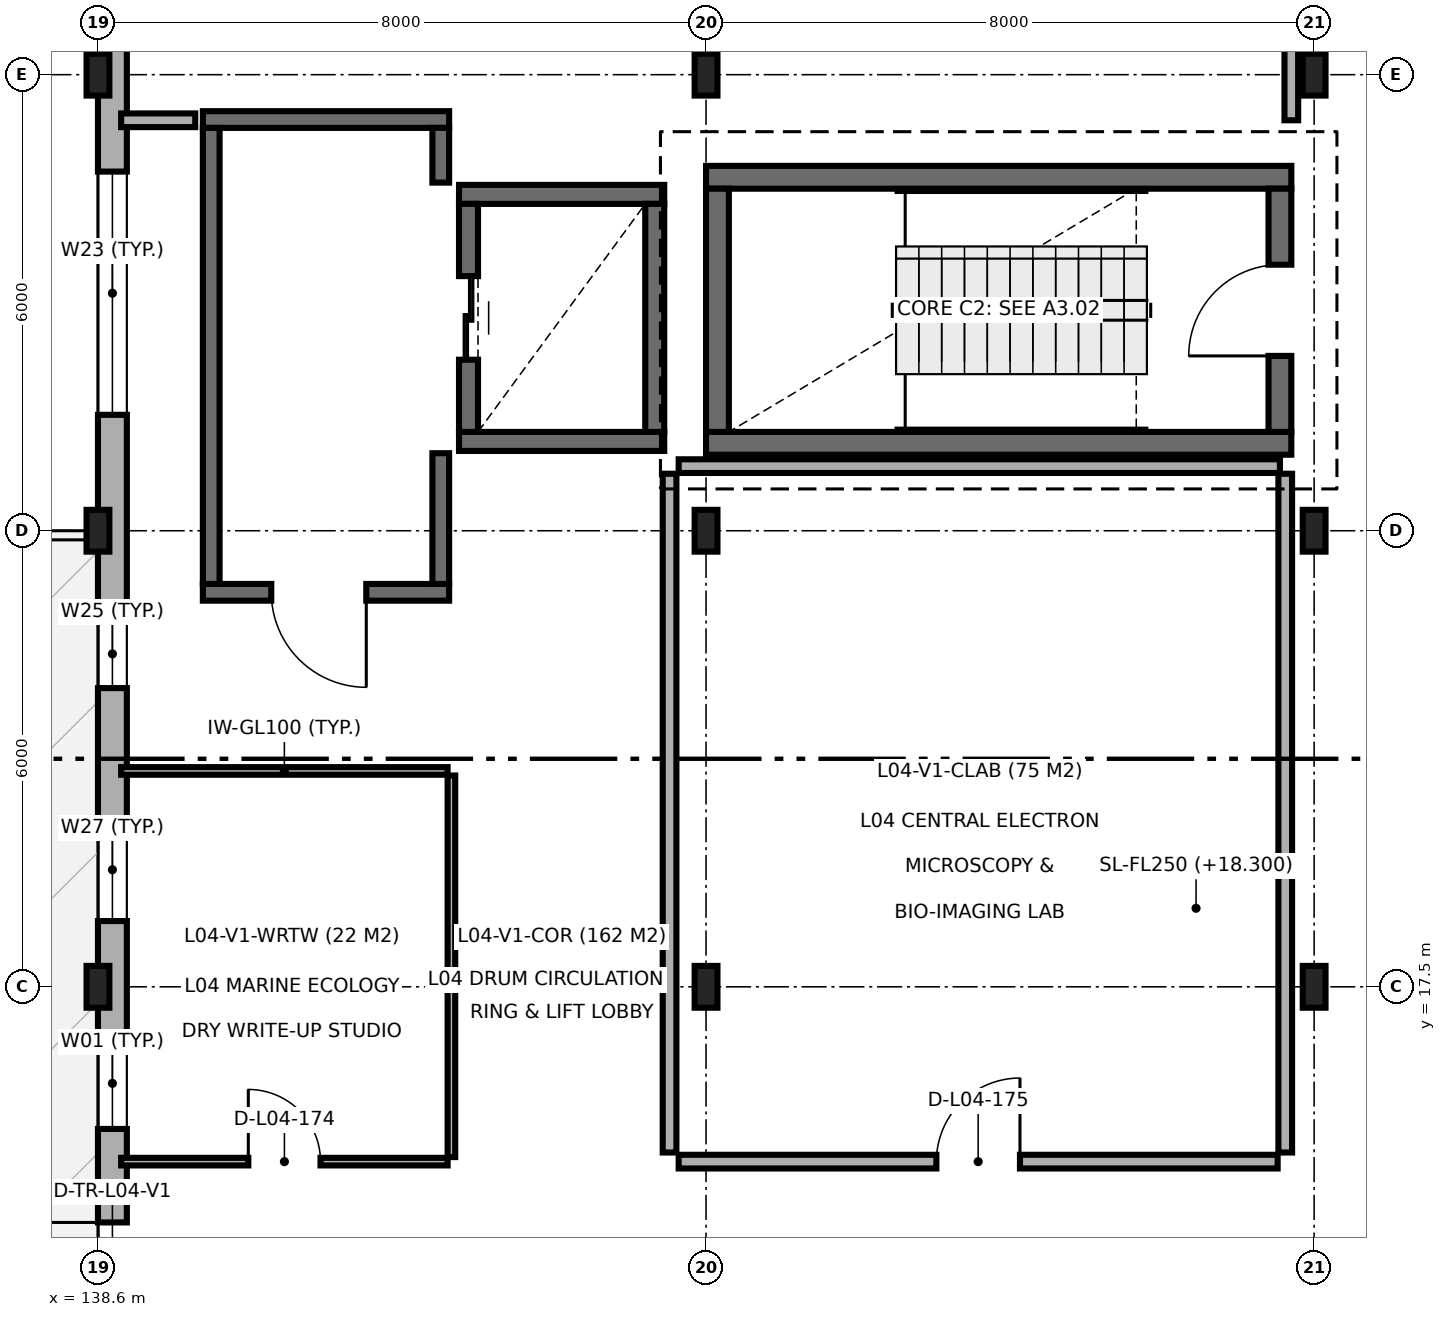
"""IFC4 building model, lengths in metres.
Left out: names, types, materials, properties, quantities, classifications, styles, units other than length and angle.
Written with IfcOpenShell. Run it as: python <this file> out.ifc"""

import sys

from ifc_helpers import new_model, si_unit, direction, frame, frame_2d, origin, origin_2d, place, context, subcontext, project, spatial, rectangle, i_section, extrude, element, fill, save


model = new_model("IFC4")
c1 = context("Model", 3, precision=1e-05, world=origin(), true_north=direction((0.0, 1.0)))
c2 = subcontext(c1, "Body", "Model", "MODEL_VIEW")
j1 = project(units=[si_unit("LENGTHUNIT", "METRE"), si_unit("PLANEANGLEUNIT", "RADIAN")], contexts=[c1])
p1 = place(None, origin())
s1 = spatial("IfcSite", under=j1, at=p1, CompositionType="ELEMENT")
p2 = place(p1, origin())
s2 = spatial("IfcBuilding", under=s1, at=p2, CompositionType="ELEMENT")
p3 = place(p2, frame((0.0, 0.0, 18.3)))
s3 = spatial("IfcBuildingStorey", under=s2, at=p3, CompositionType="ELEMENT", Elevation=18.3)
for number, where, z_axis, x_axis in (
    (1, (138.6, 17.5, 0.0), (0.0, 0.0, 1.0), (1.0, 0.0, 0.0)),
    (2, (138.6, 23.5, 0.0), (0.0, 0.0, 1.0), (1.0, 0.0, 0.0)),
    (3, (138.6, 29.5, 0.0), (0.0, 0.0, 1.0), (1.0, 0.0, 0.0)),
    (4, (146.6, 17.5, 0.0), (0.0, 0.0, 1.0), (1.0, 0.0, 0.0)),
    (5, (146.6, 23.5, 0.0), (0.0, 0.0, 1.0), (1.0, 0.0, 0.0)),
    (6, (146.6, 29.5, 0.0), (0.0, 0.0, 1.0), (1.0, 0.0, 0.0)),
    (7, (154.6, 17.5, 0.0), (0.0, 0.0, 1.0), (1.0, 0.0, 0.0)),
    (8, (154.6, 23.5, 0.0), (0.0, 0.0, 1.0), (1.0, 0.0, 0.0)),
    (9, (154.6, 29.5, 0.0), (0.0, 0.0, 1.0), (1.0, 0.0, 0.0)),
):
    element("IfcColumn", number, at=place(p3, frame(where, z_axis=z_axis, x_axis=x_axis)), inside=s3, PredefinedType="COLUMN", context=c2, shape_type="SweptSolid", body=[
        extrude(i_section(OverallWidth=0.3, OverallDepth=0.55, WebThickness=0.015, FlangeThickness=0.029, FilletRadius=0.027, at=origin_2d()), origin(), (0.0, 0.0, 1.0), 4.5),
    ])
for number, where, z_axis, x_axis in (
    (10, (146.6, 24.65, 0.0), (0.0, 0.0, 1.0), (1.0, 0.0, 0.0)),
    (11, (154.3, 28.15, 0.0), (0.0, 0.0, 1.0), (-1.0, 0.0, 0.0)),
):
    element("IfcWall", number, at=place(p3, frame(where, z_axis=z_axis, x_axis=x_axis)), inside=s3, PredefinedType="SHEAR", context=c2, shape_type="SweptSolid", body=[
        extrude(rectangle(XDim=7.7, YDim=0.3, at=frame_2d((3.85, 0.0))), origin(), (0.0, 0.0, 1.0), 4.5),
    ])
p4 = place(p3, frame((146.75, 28.0, 0.0), z_axis=(0.0, 0.0, 1.0), x_axis=(0.0, -1.0, 0.0)))
e12 = element("IfcWall", 12, at=p4, inside=s3, PredefinedType="SHEAR", context=c2, shape_type="SweptSolid", body=[
    extrude(rectangle(XDim=3.2, YDim=0.3, at=frame_2d((1.6, 0.0))), origin(), (0.0, 0.0, 1.0), 4.5),
])
p5 = place(p3, frame((154.15, 24.8, 0.0), z_axis=(0.0, 0.0, 1.0), x_axis=(0.0, 1.0, 0.0)))
e13 = element("IfcWall", 13, at=p5, inside=s3, PredefinedType="SHEAR", context=c2, shape_type="SweptSolid", body=[
    extrude(rectangle(XDim=3.2, YDim=0.3, at=frame_2d((1.6, 0.0))), origin(), (0.0, 0.0, 1.0), 4.5),
])
p6 = place(p5, frame((1.0, 0.0, 0.0)))
e14 = element("IfcOpeningElement", 14, at=p6, cuts=e13, PredefinedType="OPENING", context=c2, shape_type="SweptSolid", body=[
    extrude(rectangle(XDim=1.2, YDim=2.15, at=frame_2d((0.6, 1.075))), frame((0.0, 0.16, 0.0), z_axis=(0.0, -1.0, 0.0), x_axis=(1.0, 0.0, 0.0)), (0.0, 0.0, 1.0), 0.32),
])
for number, where, z_axis, x_axis in (
    (15, (143.35, 24.675, 0.0), (0.0, 0.0, 1.0), (1.0, 0.0, 0.0)),
    (16, (146.05, 27.925, 0.0), (0.0, 0.0, 1.0), (-1.0, 0.0, 0.0)),
):
    element("IfcWall", number, at=place(p3, frame(where, z_axis=z_axis, x_axis=x_axis)), inside=s3, PredefinedType="SHEAR", context=c2, shape_type="SweptSolid", body=[
        extrude(rectangle(XDim=2.7, YDim=0.25, at=frame_2d((1.35, 0.0))), origin(), (0.0, 0.0, 1.0), 4.5),
    ])
p7 = place(p3, frame((143.475, 27.8, 0.0), z_axis=(0.0, 0.0, 1.0), x_axis=(0.0, -1.0, 0.0)))
e17 = element("IfcWall", 17, at=p7, inside=s3, PredefinedType="SHEAR", context=c2, shape_type="SweptSolid", body=[
    extrude(rectangle(XDim=3.0, YDim=0.25, at=frame_2d((1.5, 0.0))), origin(), (0.0, 0.0, 1.0), 4.5),
])
p8 = place(p7, frame((0.95, 0.0, 0.0)))
e18 = element("IfcOpeningElement", 18, at=p8, cuts=e17, PredefinedType="OPENING", context=c2, shape_type="SweptSolid", body=[
    extrude(rectangle(XDim=1.1, YDim=2.15, at=frame_2d((0.55, 1.075))), frame((0.0, 0.135, 0.0), z_axis=(0.0, -1.0, 0.0), x_axis=(1.0, 0.0, 0.0)), (0.0, 0.0, 1.0), 0.27),
])
p9 = place(p3, frame((145.925, 24.8, 0.0), z_axis=(0.0, 0.0, 1.0), x_axis=(0.0, 1.0, 0.0)))
e19 = element("IfcWall", 19, at=p9, inside=s3, PredefinedType="SHEAR", context=c2, shape_type="SweptSolid", body=[
    extrude(rectangle(XDim=3.0, YDim=0.25, at=frame_2d((1.5, 0.0))), origin(), (0.0, 0.0, 1.0), 4.5),
])
p10 = place(p3, frame((139.98, 22.69, 0.0), z_axis=(0.0, 0.0, 1.0), x_axis=(1.0, 0.0, 0.0)))
e20 = element("IfcWall", 20, at=p10, inside=s3, PredefinedType="SOLIDWALL", context=c2, shape_type="SweptSolid", body=[
    extrude(rectangle(XDim=3.24, YDim=0.22, at=frame_2d((1.62, 0.0))), origin(), (0.0, 0.0, 1.0), 4.28),
])
p11 = place(p10, frame((0.9, 0.0, 0.0)))
e21 = element("IfcOpeningElement", 21, at=p11, cuts=e20, PredefinedType="OPENING", context=c2, shape_type="SweptSolid", body=[
    extrude(rectangle(XDim=1.25, YDim=2.15, at=frame_2d((0.625, 1.075))), frame((0.0, 0.12, 0.0), z_axis=(0.0, -1.0, 0.0), x_axis=(1.0, 0.0, 0.0)), (0.0, 0.0, 1.0), 0.24),
])
p12 = place(p3, frame((143.22, 28.91, 0.0), z_axis=(0.0, 0.0, 1.0), x_axis=(-1.0, 0.0, 0.0)))
e22 = element("IfcWall", 22, at=p12, inside=s3, PredefinedType="SOLIDWALL", context=c2, shape_type="SweptSolid", body=[
    extrude(rectangle(XDim=3.24, YDim=0.22, at=frame_2d((1.62, 0.0))), origin(), (0.0, 0.0, 1.0), 4.28),
])
p13 = place(p3, frame((140.09, 28.8, 0.0), z_axis=(0.0, 0.0, 1.0), x_axis=(0.0, -1.0, 0.0)))
e23 = element("IfcWall", 23, at=p13, inside=s3, PredefinedType="SOLIDWALL", context=c2, shape_type="SweptSolid", body=[
    extrude(rectangle(XDim=6.0, YDim=0.22, at=frame_2d((3.0, 0.0))), origin(), (0.0, 0.0, 1.0), 4.28),
])
p14 = place(p3, frame((143.11, 22.8, 0.0), z_axis=(0.0, 0.0, 1.0), x_axis=(0.0, 1.0, 0.0)))
e24 = element("IfcWall", 24, at=p14, inside=s3, PredefinedType="SOLIDWALL", context=c2, shape_type="SweptSolid", body=[
    extrude(rectangle(XDim=1.72, YDim=0.22, at=frame_2d((0.86, 0.0))), origin(), (0.0, 0.0, 1.0), 4.28),
])
p15 = place(p3, frame((143.11, 28.08, 0.0), z_axis=(0.0, 0.0, 1.0), x_axis=(0.0, 1.0, 0.0)))
e25 = element("IfcWall", 25, at=p15, inside=s3, PredefinedType="SOLIDWALL", context=c2, shape_type="SweptSolid", body=[
    extrude(rectangle(XDim=0.72, YDim=0.22, at=frame_2d((0.36, 0.0))), origin(), (0.0, 0.0, 1.0), 4.28),
])
p16 = place(p3, frame((138.79, 41.138, 0.0), z_axis=(0.0, 0.0, 1.0), x_axis=(0.0, -1.0, 0.0)))
e26 = element("IfcWall", 26, at=p16, inside=s3, PredefinedType="SOLIDWALL", context=c2, shape_type="SweptSolid", body=[
    extrude(rectangle(XDim=36.238, YDim=0.38, at=frame_2d((18.119, 0.0))), origin(), (0.0, 0.0, 1.0), 4.28),
])
p17 = place(p16, frame((26.738, 0.0, 0.0)))
e27 = element("IfcOpeningElement", 27, at=p17, cuts=e26, PredefinedType="OPENING", context=c2, shape_type="SweptSolid", body=[
    extrude(rectangle(XDim=1.4, YDim=2.2, at=frame_2d((0.7, 1.1))), frame((0.0, 0.2, 0.0), z_axis=(0.0, -1.0, 0.0), x_axis=(1.0, 0.0, 0.0)), (0.0, 0.0, 1.0), 0.4),
])
p18 = place(p16, frame((8.268, 0.0, 0.9)))
e28 = element("IfcOpeningElement", 28, at=p18, cuts=e26, PredefinedType="OPENING", context=c2, shape_type="SweptSolid", body=[
    extrude(rectangle(XDim=2.0, YDim=2.4, at=frame_2d((1.0, 1.2))), frame((0.0, 0.2, 0.0), z_axis=(0.0, -1.0, 0.0), x_axis=(1.0, 0.0, 0.0)), (0.0, 0.0, 1.0), 0.4),
])
p19 = place(p16, frame((12.913, 0.0, 0.9)))
e29 = element("IfcOpeningElement", 29, at=p19, cuts=e26, PredefinedType="OPENING", context=c2, shape_type="SweptSolid", body=[
    extrude(rectangle(XDim=3.2, YDim=2.4, at=frame_2d((1.6, 1.2))), frame((0.0, 0.2, 0.0), z_axis=(0.0, -1.0, 0.0), x_axis=(1.0, 0.0, 0.0)), (0.0, 0.0, 1.0), 0.4),
])
p20 = place(p16, frame((18.808, 0.0, 0.9)))
e30 = element("IfcOpeningElement", 30, at=p20, cuts=e26, PredefinedType="OPENING", context=c2, shape_type="SweptSolid", body=[
    extrude(rectangle(XDim=0.9, YDim=1.4, at=frame_2d((0.45, 0.7))), frame((0.0, 0.2, 0.0), z_axis=(0.0, -1.0, 0.0), x_axis=(1.0, 0.0, 0.0)), (0.0, 0.0, 1.0), 0.4),
])
p21 = place(p16, frame((21.423, 0.0, 0.9)))
e31 = element("IfcOpeningElement", 31, at=p21, cuts=e26, PredefinedType="OPENING", context=c2, shape_type="SweptSolid", body=[
    extrude(rectangle(XDim=1.35, YDim=1.95, at=frame_2d((0.675, 0.975))), frame((0.0, 0.2, 0.0), z_axis=(0.0, -1.0, 0.0), x_axis=(1.0, 0.0, 0.0)), (0.0, 0.0, 1.0), 0.4),
])
p22 = place(p16, frame((24.308, 0.0, 0.9)))
e32 = element("IfcOpeningElement", 32, at=p22, cuts=e26, PredefinedType="OPENING", context=c2, shape_type="SweptSolid", body=[
    extrude(rectangle(XDim=1.2, YDim=1.8, at=frame_2d((0.6, 0.9))), frame((0.0, 0.2, 0.0), z_axis=(0.0, -1.0, 0.0), x_axis=(1.0, 0.0, 0.0)), (0.0, 0.0, 1.0), 0.4),
])
p23 = place(p16, frame((31.353, 0.0, 0.9)))
e33 = element("IfcOpeningElement", 33, at=p23, cuts=e26, PredefinedType="OPENING", context=c2, shape_type="SweptSolid", body=[
    extrude(rectangle(XDim=2.55, YDim=1.95, at=frame_2d((1.275, 0.975))), frame((0.0, 0.2, 0.0), z_axis=(0.0, -1.0, 0.0), x_axis=(1.0, 0.0, 0.0)), (0.0, 0.0, 1.0), 0.4),
])
p24 = place(p3, frame((138.905, 20.34, 0.0), z_axis=(0.0, 0.0, 1.0), x_axis=(1.0, 0.0, 0.0)))
e34 = element("IfcWall", 34, at=p24, inside=s3, PredefinedType="PARTITIONING", context=c2, shape_type="SweptSolid", body=[
    extrude(rectangle(XDim=4.295, YDim=0.1, at=frame_2d((2.147, 0.0))), origin(), (0.0, 0.0, 1.0), 4.28),
])
p25 = place(p3, frame((143.25, 15.26, 0.0), z_axis=(0.0, 0.0, 1.0), x_axis=(0.0, 1.0, 0.0)))
e35 = element("IfcWall", 35, at=p25, inside=s3, PredefinedType="PARTITIONING", context=c2, shape_type="SweptSolid", body=[
    extrude(rectangle(XDim=5.02, YDim=0.1, at=frame_2d((2.51, 0.0))), origin(), (0.0, 0.0, 1.0), 4.28),
])
p26 = place(p3, frame((138.905, 15.2, 0.0), z_axis=(0.0, 0.0, 1.0), x_axis=(1.0, 0.0, 0.0)))
e36 = element("IfcWall", 36, at=p26, inside=s3, PredefinedType="PARTITIONING", context=c2, shape_type="SweptSolid", body=[
    extrude(rectangle(XDim=4.295, YDim=0.1, at=frame_2d((2.147, 0.0))), origin(), (0.0, 0.0, 1.0), 4.28),
])
p27 = place(p26, frame((1.673, 0.0, 0.0)))
e37 = element("IfcOpeningElement", 37, at=p27, cuts=e36, PredefinedType="OPENING", context=c2, shape_type="SweptSolid", body=[
    extrude(rectangle(XDim=0.95, YDim=2.1, at=frame_2d((0.475, 1.05))), frame((0.0, 0.06, 0.0), z_axis=(0.0, -1.0, 0.0), x_axis=(1.0, 0.0, 0.0)), (0.0, 0.0, 1.0), 0.12),
])
p28 = place(p3, frame((146.12, 15.32, 0.0), z_axis=(0.0, 0.0, 1.0), x_axis=(0.0, 1.0, 0.0)))
e38 = element("IfcWall", 38, at=p28, inside=s3, PredefinedType="PARTITIONING", context=c2, shape_type="SweptSolid", body=[
    extrude(rectangle(XDim=8.93, YDim=0.18, at=frame_2d((4.465, 0.0))), origin(), (0.0, 0.0, 1.0), 4.28),
])
p29 = place(p3, frame((146.24, 24.35, 0.0), z_axis=(0.0, 0.0, 1.0), x_axis=(1.0, 0.0, 0.0)))
e39 = element("IfcWall", 39, at=p29, inside=s3, PredefinedType="PARTITIONING", context=c2, shape_type="SweptSolid", body=[
    extrude(rectangle(XDim=7.91, YDim=0.18, at=frame_2d((3.955, 0.0))), origin(), (0.0, 0.0, 1.0), 3.41),
])
p30 = place(p3, frame((154.22, 15.32, 0.0), z_axis=(0.0, 0.0, 1.0), x_axis=(0.0, 1.0, 0.0)))
e40 = element("IfcWall", 40, at=p30, inside=s3, PredefinedType="PARTITIONING", context=c2, shape_type="SweptSolid", body=[
    extrude(rectangle(XDim=8.93, YDim=0.18, at=frame_2d((4.465, 0.0))), origin(), (0.0, 0.0, 1.0), 4.28),
])
p31 = place(p3, frame((146.24, 15.2, 0.0), z_axis=(0.0, 0.0, 1.0), x_axis=(1.0, 0.0, 0.0)))
e41 = element("IfcWall", 41, at=p31, inside=s3, PredefinedType="PARTITIONING", context=c2, shape_type="SweptSolid", body=[
    extrude(rectangle(XDim=7.88, YDim=0.18, at=frame_2d((3.94, 0.0))), origin(), (0.0, 0.0, 1.0), 4.28),
])
p32 = place(p31, frame((3.39, 0.0, 0.0)))
e42 = element("IfcOpeningElement", 42, at=p32, cuts=e41, PredefinedType="OPENING", context=c2, shape_type="SweptSolid", body=[
    extrude(rectangle(XDim=1.1, YDim=2.15, at=frame_2d((0.55, 1.075))), frame((0.0, 0.1, 0.0), z_axis=(0.0, -1.0, 0.0), x_axis=(1.0, 0.0, 0.0)), (0.0, 0.0, 1.0), 0.2),
])
p33 = place(p3, frame((138.905, 28.9, 0.0), z_axis=(0.0, 0.0, 1.0), x_axis=(1.0, 0.0, 0.0)))
e43 = element("IfcWall", 43, at=p33, inside=s3, PredefinedType="PARTITIONING", context=c2, shape_type="SweptSolid", body=[
    extrude(rectangle(XDim=0.975, YDim=0.18, at=frame_2d((0.487, 0.0))), origin(), (0.0, 0.0, 1.0), 4.28),
])
p34 = place(p3, frame((154.3, 28.9, 0.0), z_axis=(0.0, 0.0, 1.0), x_axis=(0.0, 1.0, 0.0)))
e44 = element("IfcWall", 44, at=p34, inside=s3, PredefinedType="PARTITIONING", context=c2, shape_type="SweptSolid", body=[
    extrude(rectangle(XDim=12.295, YDim=0.18, at=frame_2d((6.147, 0.0))), origin(), (0.0, 0.0, 1.0), 3.93),
])
p35 = place(p34, frame((3.918, 0.0, 0.0)))
e45 = element("IfcOpeningElement", 45, at=p35, cuts=e44, PredefinedType="OPENING", context=c2, shape_type="SweptSolid", body=[
    extrude(rectangle(XDim=1.1, YDim=2.15, at=frame_2d((0.55, 1.075))), frame((0.0, 0.1, 0.0), z_axis=(0.0, -1.0, 0.0), x_axis=(1.0, 0.0, 0.0)), (0.0, 0.0, 1.0), 0.2),
])
p36 = place(p6, origin())
e46 = element("IfcDoor", 46, at=p36, inside=s3, OperationType="SINGLE_SWING_LEFT", PredefinedType="DOOR", context=c2, shape_type="SweptSolid", body=[
    extrude(rectangle(XDim=1.2, YDim=2.15, at=frame_2d((0.6, 1.075))), frame((0.0, 0.025, 0.0), z_axis=(0.0, -1.0, 0.0), x_axis=(1.0, 0.0, 0.0)), (0.0, 0.0, 1.0), 0.05),
])
fill(e14, e46)
p37 = place(p8, origin())
e47 = element("IfcDoor", 47, at=p37, inside=s3, OperationType="DOUBLE_DOOR_SLIDING", PredefinedType="DOOR", context=c2, shape_type="SweptSolid", body=[
    extrude(rectangle(XDim=1.1, YDim=2.15, at=frame_2d((0.55, 1.075))), frame((0.0, 0.025, 0.0), z_axis=(0.0, -1.0, 0.0), x_axis=(1.0, 0.0, 0.0)), (0.0, 0.0, 1.0), 0.05),
])
fill(e18, e47)
p38 = place(p11, frame((1.25, 0.0, 0.0), z_axis=(0.0, 0.0, 1.0), x_axis=(-1.0, 0.0, 0.0)))
e48 = element("IfcDoor", 48, at=p38, inside=s3, OperationType="SINGLE_SWING_RIGHT", PredefinedType="DOOR", context=c2, shape_type="SweptSolid", body=[
    extrude(rectangle(XDim=1.25, YDim=2.15, at=frame_2d((0.625, 1.075))), frame((0.0, 0.025, 0.0), z_axis=(0.0, -1.0, 0.0), x_axis=(1.0, 0.0, 0.0)), (0.0, 0.0, 1.0), 0.05),
])
fill(e21, e48)
p39 = place(p17, frame((1.4, 0.0, 0.0), z_axis=(0.0, 0.0, 1.0), x_axis=(-1.0, 0.0, 0.0)))
e49 = element("IfcDoor", 49, at=p39, inside=s3, OperationType="SINGLE_SWING_LEFT", PredefinedType="DOOR", context=c2, shape_type="SweptSolid", body=[
    extrude(rectangle(XDim=1.4, YDim=2.2, at=frame_2d((0.7, 1.1))), frame((0.0, 0.025, 0.0), z_axis=(0.0, -1.0, 0.0), x_axis=(1.0, 0.0, 0.0)), (0.0, 0.0, 1.0), 0.05),
])
fill(e27, e49)
p40 = place(p19, origin())
e50 = element("IfcWindow", 50, at=p40, inside=s3, PartitioningType="SINGLE_PANEL", PredefinedType="WINDOW", context=c2, shape_type="SweptSolid", body=[
    extrude(rectangle(XDim=3.2, YDim=2.4, at=frame_2d((1.6, 1.2))), frame((0.0, 0.03, 0.0), z_axis=(0.0, -1.0, 0.0), x_axis=(1.0, 0.0, 0.0)), (0.0, 0.0, 1.0), 0.06),
])
fill(e29, e50)
p41 = place(p20, origin())
e51 = element("IfcWindow", 51, at=p41, inside=s3, PartitioningType="SINGLE_PANEL", PredefinedType="WINDOW", context=c2, shape_type="SweptSolid", body=[
    extrude(rectangle(XDim=0.9, YDim=1.4, at=frame_2d((0.45, 0.7))), frame((0.0, 0.03, 0.0), z_axis=(0.0, -1.0, 0.0), x_axis=(1.0, 0.0, 0.0)), (0.0, 0.0, 1.0), 0.06),
])
fill(e30, e51)
p42 = place(p21, origin())
e52 = element("IfcWindow", 52, at=p42, inside=s3, PartitioningType="SINGLE_PANEL", PredefinedType="WINDOW", context=c2, shape_type="SweptSolid", body=[
    extrude(rectangle(XDim=1.35, YDim=1.95, at=frame_2d((0.675, 0.975))), frame((0.0, 0.03, 0.0), z_axis=(0.0, -1.0, 0.0), x_axis=(1.0, 0.0, 0.0)), (0.0, 0.0, 1.0), 0.06),
])
fill(e31, e52)
p43 = place(p22, origin())
e53 = element("IfcWindow", 53, at=p43, inside=s3, PartitioningType="SINGLE_PANEL", PredefinedType="WINDOW", context=c2, shape_type="SweptSolid", body=[
    extrude(rectangle(XDim=1.2, YDim=1.8, at=frame_2d((0.6, 0.9))), frame((0.0, 0.03, 0.0), z_axis=(0.0, -1.0, 0.0), x_axis=(1.0, 0.0, 0.0)), (0.0, 0.0, 1.0), 0.06),
])
fill(e32, e53)
p44 = place(p27, origin())
e54 = element("IfcDoor", 54, at=p44, inside=s3, OperationType="SINGLE_SWING_LEFT", PredefinedType="DOOR", context=c2, shape_type="SweptSolid", body=[
    extrude(rectangle(XDim=0.95, YDim=2.1, at=frame_2d((0.475, 1.05))), frame((0.0, 0.025, 0.0), z_axis=(0.0, -1.0, 0.0), x_axis=(1.0, 0.0, 0.0)), (0.0, 0.0, 1.0), 0.05),
])
fill(e37, e54)
p45 = place(p32, origin())
e55 = element("IfcDoor", 55, at=p45, inside=s3, OperationType="SINGLE_SWING_RIGHT", PredefinedType="DOOR", context=c2, shape_type="SweptSolid", body=[
    extrude(rectangle(XDim=1.1, YDim=2.15, at=frame_2d((0.55, 1.075))), frame((0.0, 0.025, 0.0), z_axis=(0.0, -1.0, 0.0), x_axis=(1.0, 0.0, 0.0)), (0.0, 0.0, 1.0), 0.05),
])
fill(e42, e55)
save(model, sys.argv[1])
